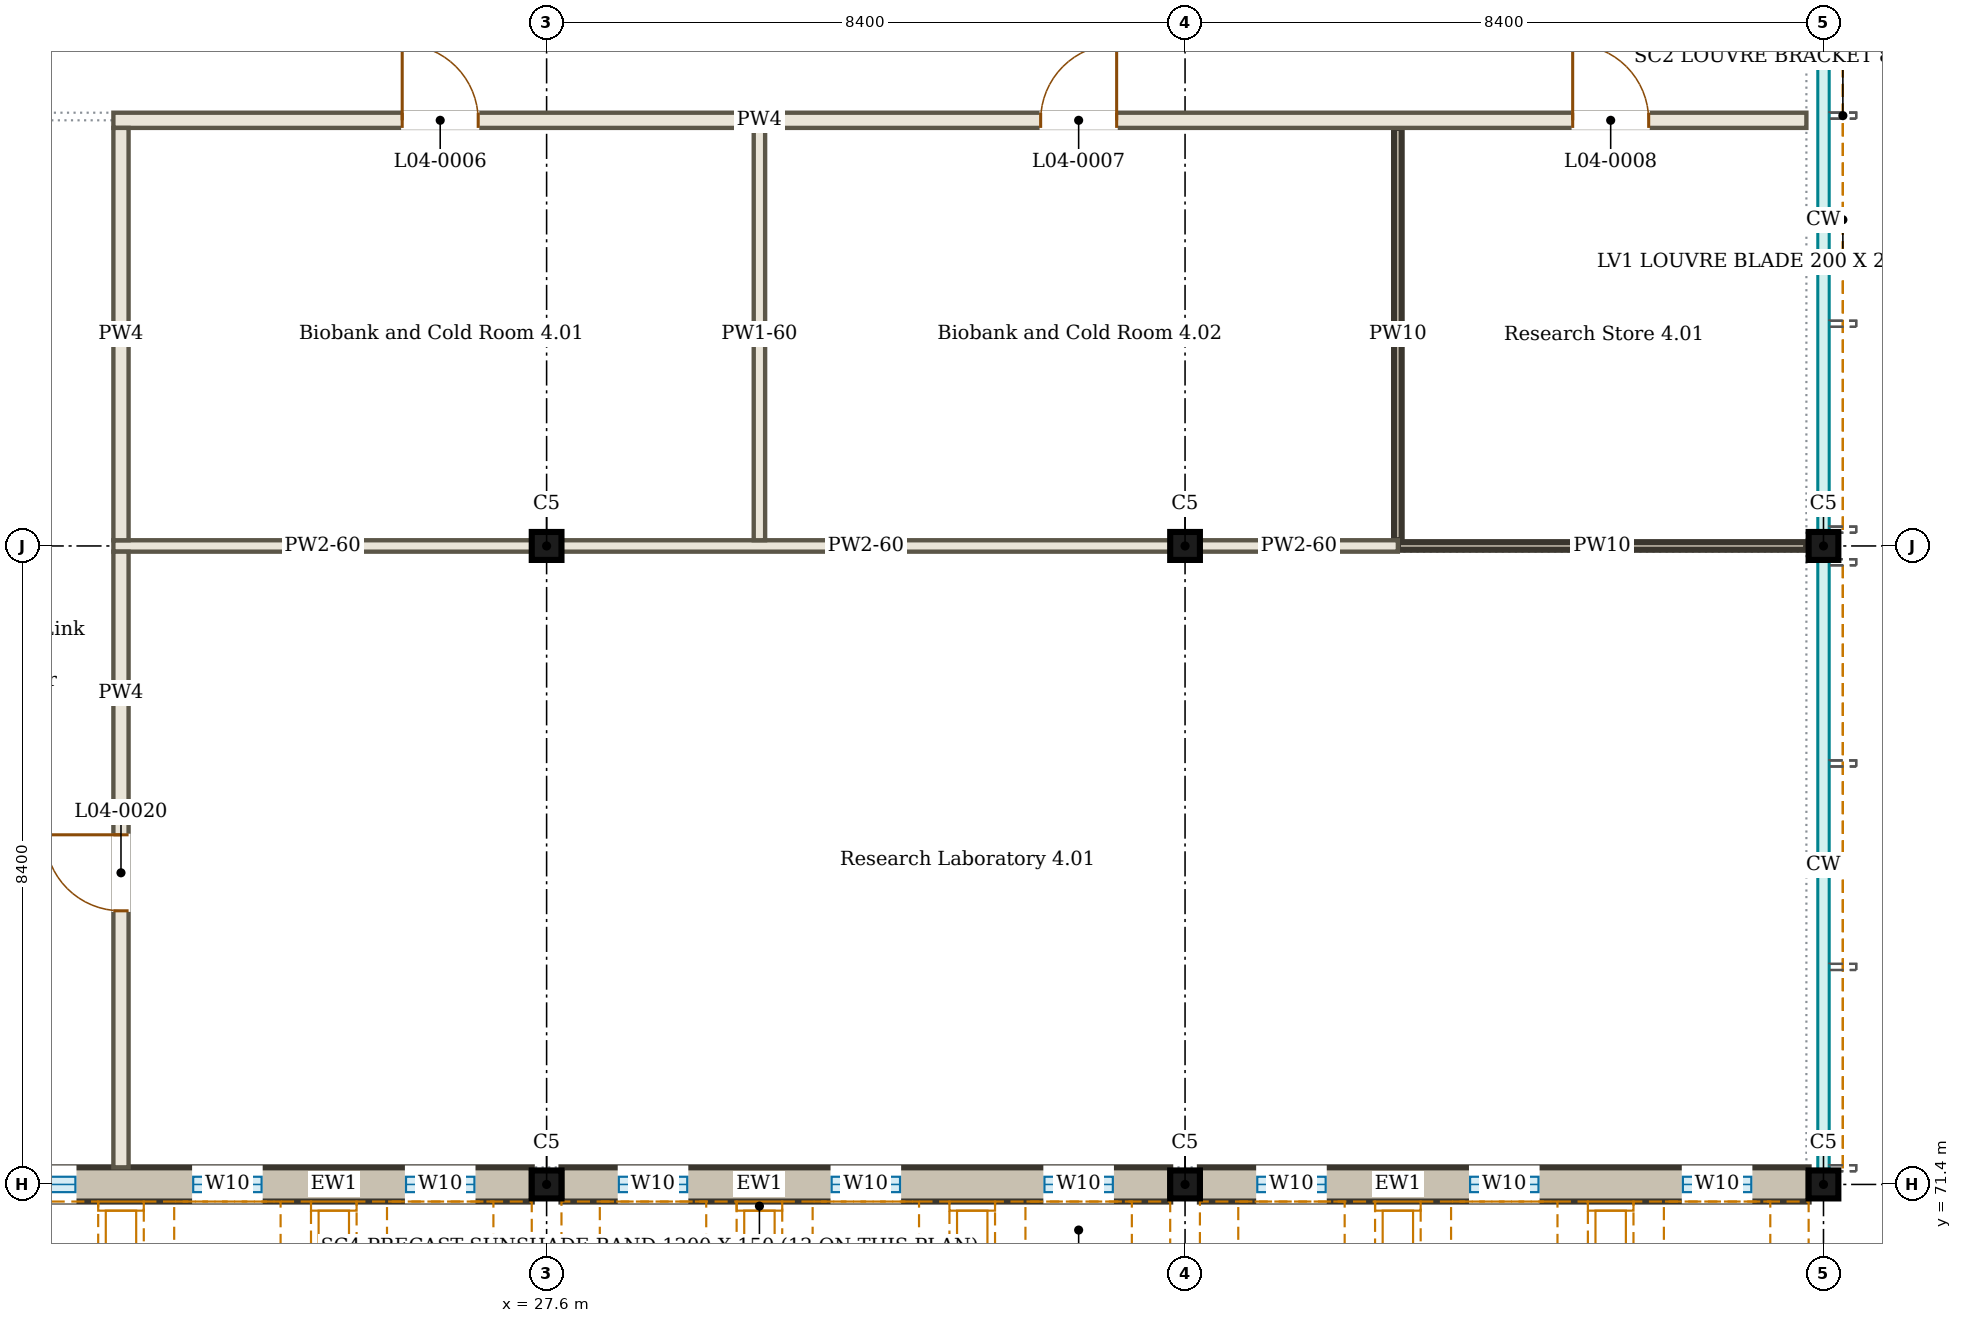
"""IFC4 building model, lengths in metres.
Left out: names, types, materials, properties, quantities, classifications, styles, units other than length and angle.
Written with IfcOpenShell. Run it as: python <this file> out.ifc"""

import sys

from ifc_helpers import new_model, si_unit, direction, frame, frame_2d, origin, origin_2d, place, context, subcontext, project, spatial, rectangle, i_section, extrude, element, fill, save


model = new_model("IFC4")
c1 = context("Model", 3, precision=1e-05, world=origin(), true_north=direction((0.0, 1.0)))
c2 = subcontext(c1, "Body", "Model", "MODEL_VIEW")
j1 = project(units=[si_unit("LENGTHUNIT", "METRE"), si_unit("PLANEANGLEUNIT", "RADIAN")], contexts=[c1])
p1 = place(None, origin())
s1 = spatial("IfcSite", under=j1, at=p1, CompositionType="ELEMENT")
p2 = place(p1, origin())
s2 = spatial("IfcBuilding", under=s1, at=p2, CompositionType="ELEMENT")
p3 = place(p2, frame((0.0, 0.0, 18.0)))
s3 = spatial("IfcBuildingStorey", under=s2, at=p3, CompositionType="ELEMENT", Elevation=18.0)
for number, where, z_axis, x_axis in (
    (1, (27.6, 71.4, 0.0), (0.0, 0.0, 1.0), (1.0, 0.0, 0.0)),
    (2, (36.0, 71.4, 0.0), (0.0, 0.0, 1.0), (1.0, 0.0, 0.0)),
    (3, (44.4, 71.4, 0.0), (0.0, 0.0, 1.0), (1.0, 0.0, 0.0)),
    (4, (27.6, 79.8, 0.0), (0.0, 0.0, 1.0), (1.0, 0.0, 0.0)),
    (5, (36.0, 79.8, 0.0), (0.0, 0.0, 1.0), (1.0, 0.0, 0.0)),
    (6, (44.4, 79.8, 0.0), (0.0, 0.0, 1.0), (1.0, 0.0, 0.0)),
):
    element("IfcColumn", number, at=place(p3, frame(where, z_axis=z_axis, x_axis=x_axis)), inside=s3, PredefinedType="COLUMN", context=c2, shape_type="SweptSolid", body=[
        extrude(i_section(OverallWidth=0.391, OverallDepth=0.368, WebThickness=0.015, FlangeThickness=0.024, FilletRadius=0.027, at=origin_2d()), origin(), (0.0, 0.0, 1.0), 4.5),
    ])
p4 = place(p3, frame((19.2, 71.4, 0.0), z_axis=(0.0, 0.0, 1.0), x_axis=(1.0, 0.0, 0.0)))
e7 = element("IfcWall", 7, at=p4, inside=s3, PredefinedType="SOLIDWALL", context=c2, shape_type="SweptSolid", body=[
    extrude(rectangle(XDim=8.205, YDim=0.45, at=frame_2d((4.102, 0.0))), origin(), (0.0, 0.0, 1.0), 3.886),
])
p5 = place(p4, frame((0.6, 0.0, 2.7)))
e8 = element("IfcOpeningElement", 8, at=p5, cuts=e7, PredefinedType="OPENING", context=c2, shape_type="SweptSolid", body=[
    extrude(rectangle(XDim=1.6, YDim=0.6, at=frame_2d((0.8, 0.3))), frame((0.0, 0.235, 0.0), z_axis=(0.0, -1.0, 0.0), x_axis=(1.0, 0.0, 0.0)), (0.0, 0.0, 1.0), 0.47),
])
p6 = place(p4, frame((3.75, 0.0, 1.0)))
e9 = element("IfcOpeningElement", 9, at=p6, cuts=e7, PredefinedType="OPENING", context=c2, shape_type="SweptSolid", body=[
    extrude(rectangle(XDim=0.9, YDim=1.2, at=frame_2d((0.45, 0.6))), frame((0.0, 0.235, 0.0), z_axis=(0.0, -1.0, 0.0), x_axis=(1.0, 0.0, 0.0)), (0.0, 0.0, 1.0), 0.47),
])
p7 = place(p4, frame((6.55, 0.0, 1.0)))
e10 = element("IfcOpeningElement", 10, at=p7, cuts=e7, PredefinedType="OPENING", context=c2, shape_type="SweptSolid", body=[
    extrude(rectangle(XDim=0.9, YDim=1.2, at=frame_2d((0.45, 0.6))), frame((0.0, 0.235, 0.0), z_axis=(0.0, -1.0, 0.0), x_axis=(1.0, 0.0, 0.0)), (0.0, 0.0, 1.0), 0.47),
])
p8 = place(p3, frame((27.795, 71.4, 0.0), z_axis=(0.0, 0.0, 1.0), x_axis=(1.0, 0.0, 0.0)))
e11 = element("IfcWall", 11, at=p8, inside=s3, PredefinedType="SOLIDWALL", context=c2, shape_type="SweptSolid", body=[
    extrude(rectangle(XDim=8.009, YDim=0.45, at=frame_2d((4.004, 0.0))), origin(), (0.0, 0.0, 1.0), 3.886),
])
p9 = place(p8, frame((0.754, 0.0, 1.0)))
e12 = element("IfcOpeningElement", 12, at=p9, cuts=e11, PredefinedType="OPENING", context=c2, shape_type="SweptSolid", body=[
    extrude(rectangle(XDim=0.9, YDim=1.2, at=frame_2d((0.45, 0.6))), frame((0.0, 0.235, 0.0), z_axis=(0.0, -1.0, 0.0), x_axis=(1.0, 0.0, 0.0)), (0.0, 0.0, 1.0), 0.47),
])
p10 = place(p8, frame((3.554, 0.0, 1.0)))
e13 = element("IfcOpeningElement", 13, at=p10, cuts=e11, PredefinedType="OPENING", context=c2, shape_type="SweptSolid", body=[
    extrude(rectangle(XDim=0.9, YDim=1.2, at=frame_2d((0.45, 0.6))), frame((0.0, 0.235, 0.0), z_axis=(0.0, -1.0, 0.0), x_axis=(1.0, 0.0, 0.0)), (0.0, 0.0, 1.0), 0.47),
])
p11 = place(p8, frame((6.354, 0.0, 1.0)))
e14 = element("IfcOpeningElement", 14, at=p11, cuts=e11, PredefinedType="OPENING", context=c2, shape_type="SweptSolid", body=[
    extrude(rectangle(XDim=0.9, YDim=1.2, at=frame_2d((0.45, 0.6))), frame((0.0, 0.235, 0.0), z_axis=(0.0, -1.0, 0.0), x_axis=(1.0, 0.0, 0.0)), (0.0, 0.0, 1.0), 0.47),
])
p12 = place(p3, frame((36.196, 71.4, 0.0), z_axis=(0.0, 0.0, 1.0), x_axis=(1.0, 0.0, 0.0)))
e15 = element("IfcWall", 15, at=p12, inside=s3, PredefinedType="SOLIDWALL", context=c2, shape_type="SweptSolid", body=[
    extrude(rectangle(XDim=8.009, YDim=0.45, at=frame_2d((4.004, 0.0))), origin(), (0.0, 0.0, 1.0), 3.886),
])
p13 = place(p12, frame((0.754, 0.0, 1.0)))
e16 = element("IfcOpeningElement", 16, at=p13, cuts=e15, PredefinedType="OPENING", context=c2, shape_type="SweptSolid", body=[
    extrude(rectangle(XDim=0.9, YDim=1.2, at=frame_2d((0.45, 0.6))), frame((0.0, 0.235, 0.0), z_axis=(0.0, -1.0, 0.0), x_axis=(1.0, 0.0, 0.0)), (0.0, 0.0, 1.0), 0.47),
])
p14 = place(p12, frame((3.554, 0.0, 1.0)))
e17 = element("IfcOpeningElement", 17, at=p14, cuts=e15, PredefinedType="OPENING", context=c2, shape_type="SweptSolid", body=[
    extrude(rectangle(XDim=0.9, YDim=1.2, at=frame_2d((0.45, 0.6))), frame((0.0, 0.235, 0.0), z_axis=(0.0, -1.0, 0.0), x_axis=(1.0, 0.0, 0.0)), (0.0, 0.0, 1.0), 0.47),
])
p15 = place(p12, frame((6.354, 0.0, 1.0)))
e18 = element("IfcOpeningElement", 18, at=p15, cuts=e15, PredefinedType="OPENING", context=c2, shape_type="SweptSolid", body=[
    extrude(rectangle(XDim=0.9, YDim=1.2, at=frame_2d((0.45, 0.6))), frame((0.0, 0.235, 0.0), z_axis=(0.0, -1.0, 0.0), x_axis=(1.0, 0.0, 0.0)), (0.0, 0.0, 1.0), 0.47),
])
p16 = place(p3, frame((21.9, 79.8, 0.0), z_axis=(0.0, 0.0, 1.0), x_axis=(1.0, 0.0, 0.0)))
e19 = element("IfcWall", 19, at=p16, inside=s3, PredefinedType="PARTITIONING", context=c2, shape_type="SweptSolid", body=[
    extrude(rectangle(XDim=5.505, YDim=0.15, at=frame_2d((2.752, 0.0))), origin(), (0.0, 0.0, 1.0), 3.9),
])
p17 = place(p3, frame((27.795, 79.8, 0.0), z_axis=(0.0, 0.0, 1.0), x_axis=(1.0, 0.0, 0.0)))
e20 = element("IfcWall", 20, at=p17, inside=s3, PredefinedType="PARTITIONING", context=c2, shape_type="SweptSolid", body=[
    extrude(rectangle(XDim=8.009, YDim=0.15, at=frame_2d((4.004, 0.0))), origin(), (0.0, 0.0, 1.0), 3.9),
])
p18 = place(p3, frame((36.196, 79.8, 0.0), z_axis=(0.0, 0.0, 1.0), x_axis=(1.0, 0.0, 0.0)))
e21 = element("IfcWall", 21, at=p18, inside=s3, PredefinedType="PARTITIONING", context=c2, shape_type="SweptSolid", body=[
    extrude(rectangle(XDim=2.604, YDim=0.15, at=frame_2d((1.302, 0.0))), origin(), (0.0, 0.0, 1.0), 3.9),
])
p19 = place(p3, frame((38.8, 79.8, 0.0), z_axis=(0.0, 0.0, 1.0), x_axis=(1.0, 0.0, 0.0)))
e22 = element("IfcWall", 22, at=p19, inside=s3, PredefinedType="SOLIDWALL", context=c2, shape_type="SweptSolid", body=[
    extrude(rectangle(XDim=5.375, YDim=0.1, at=frame_2d((2.688, 0.0))), origin(), (0.0, 0.0, 1.0), 3.9),
])
p20 = place(p3, frame((21.9, 85.4, 0.0), z_axis=(0.0, 0.0, 1.0), x_axis=(1.0, 0.0, 0.0)))
e23 = element("IfcWall", 23, at=p20, inside=s3, PredefinedType="PARTITIONING", context=c2, shape_type="SweptSolid", body=[
    extrude(rectangle(XDim=22.275, YDim=0.2, at=frame_2d((11.138, 0.0))), origin(), (0.0, 0.0, 1.0), 3.9),
])
p21 = place(p20, frame((3.8, 0.0, 0.0)))
e24 = element("IfcOpeningElement", 24, at=p21, cuts=e23, PredefinedType="OPENING", context=c2, shape_type="SweptSolid", body=[
    extrude(rectangle(XDim=1.0, YDim=2.1, at=frame_2d((0.5, 1.05))), frame((0.0, 0.11, 0.0), z_axis=(0.0, -1.0, 0.0), x_axis=(1.0, 0.0, 0.0)), (0.0, 0.0, 1.0), 0.22),
])
p22 = place(p20, frame((12.2, 0.0, 0.0)))
e25 = element("IfcOpeningElement", 25, at=p22, cuts=e23, PredefinedType="OPENING", context=c2, shape_type="SweptSolid", body=[
    extrude(rectangle(XDim=1.0, YDim=2.1, at=frame_2d((0.5, 1.05))), frame((0.0, 0.11, 0.0), z_axis=(0.0, -1.0, 0.0), x_axis=(1.0, 0.0, 0.0)), (0.0, 0.0, 1.0), 0.22),
])
p23 = place(p20, frame((19.2, 0.0, 0.0)))
e26 = element("IfcOpeningElement", 26, at=p23, cuts=e23, PredefinedType="OPENING", context=c2, shape_type="SweptSolid", body=[
    extrude(rectangle(XDim=1.0, YDim=2.1, at=frame_2d((0.5, 1.05))), frame((0.0, 0.11, 0.0), z_axis=(0.0, -1.0, 0.0), x_axis=(1.0, 0.0, 0.0)), (0.0, 0.0, 1.0), 0.22),
])
p24 = place(p3, frame((22.0, 71.625, 0.0), z_axis=(0.0, 0.0, 1.0), x_axis=(0.0, 1.0, 0.0)))
e27 = element("IfcWall", 27, at=p24, inside=s3, PredefinedType="PARTITIONING", context=c2, shape_type="SweptSolid", body=[
    extrude(rectangle(XDim=8.1, YDim=0.2, at=frame_2d((4.05, 0.0))), origin(), (0.0, 0.0, 1.0), 3.9),
])
p25 = place(p24, frame((3.375, 0.0, 0.0)))
e28 = element("IfcOpeningElement", 28, at=p25, cuts=e27, PredefinedType="OPENING", context=c2, shape_type="SweptSolid", body=[
    extrude(rectangle(XDim=1.0, YDim=2.1, at=frame_2d((0.5, 1.05))), frame((0.0, 0.11, 0.0), z_axis=(0.0, -1.0, 0.0), x_axis=(1.0, 0.0, 0.0)), (0.0, 0.0, 1.0), 0.22),
])
p26 = place(p3, frame((22.0, 79.875, 0.0), z_axis=(0.0, 0.0, 1.0), x_axis=(0.0, 1.0, 0.0)))
e29 = element("IfcWall", 29, at=p26, inside=s3, PredefinedType="PARTITIONING", context=c2, shape_type="SweptSolid", body=[
    extrude(rectangle(XDim=5.425, YDim=0.2, at=frame_2d((2.712, 0.0))), origin(), (0.0, 0.0, 1.0), 3.9),
])
p27 = place(p3, frame((30.4, 79.875, 0.0), z_axis=(0.0, 0.0, 1.0), x_axis=(0.0, 1.0, 0.0)))
e30 = element("IfcWall", 30, at=p27, inside=s3, PredefinedType="PARTITIONING", context=c2, shape_type="SweptSolid", body=[
    extrude(rectangle(XDim=5.425, YDim=0.15, at=frame_2d((2.712, 0.0))), origin(), (0.0, 0.0, 1.0), 3.9),
])
p28 = place(p3, frame((38.8, 79.875, 0.0), z_axis=(0.0, 0.0, 1.0), x_axis=(0.0, 1.0, 0.0)))
e31 = element("IfcWall", 31, at=p28, inside=s3, PredefinedType="SOLIDWALL", context=c2, shape_type="SweptSolid", body=[
    extrude(rectangle(XDim=5.425, YDim=0.1, at=frame_2d((2.712, 0.0))), origin(), (0.0, 0.0, 1.0), 3.9),
])
p29 = place(p5, origin())
e32 = element("IfcWindow", 32, at=p29, inside=s3, PartitioningType="SINGLE_PANEL", PredefinedType="WINDOW", context=c2, shape_type="SweptSolid", body=[
    extrude(rectangle(XDim=1.6, YDim=0.6, at=frame_2d((0.8, 0.3))), frame((0.0, 0.03, 0.0), z_axis=(0.0, -1.0, 0.0), x_axis=(1.0, 0.0, 0.0)), (0.0, 0.0, 1.0), 0.06),
])
fill(e8, e32)
p30 = place(p6, origin())
e33 = element("IfcWindow", 33, at=p30, inside=s3, PartitioningType="SINGLE_PANEL", PredefinedType="WINDOW", context=c2, shape_type="SweptSolid", body=[
    extrude(rectangle(XDim=0.9, YDim=1.2, at=frame_2d((0.45, 0.6))), frame((0.0, 0.135, 0.0), z_axis=(0.0, -1.0, 0.0), x_axis=(1.0, 0.0, 0.0)), (0.0, 0.0, 1.0), 0.06),
])
fill(e9, e33)
p31 = place(p7, origin())
e34 = element("IfcWindow", 34, at=p31, inside=s3, PartitioningType="SINGLE_PANEL", PredefinedType="WINDOW", context=c2, shape_type="SweptSolid", body=[
    extrude(rectangle(XDim=0.9, YDim=1.2, at=frame_2d((0.45, 0.6))), frame((0.0, 0.135, 0.0), z_axis=(0.0, -1.0, 0.0), x_axis=(1.0, 0.0, 0.0)), (0.0, 0.0, 1.0), 0.06),
])
fill(e10, e34)
p32 = place(p9, origin())
e35 = element("IfcWindow", 35, at=p32, inside=s3, PartitioningType="SINGLE_PANEL", PredefinedType="WINDOW", context=c2, shape_type="SweptSolid", body=[
    extrude(rectangle(XDim=0.9, YDim=1.2, at=frame_2d((0.45, 0.6))), frame((0.0, 0.135, 0.0), z_axis=(0.0, -1.0, 0.0), x_axis=(1.0, 0.0, 0.0)), (0.0, 0.0, 1.0), 0.06),
])
fill(e12, e35)
p33 = place(p10, origin())
e36 = element("IfcWindow", 36, at=p33, inside=s3, PartitioningType="SINGLE_PANEL", PredefinedType="WINDOW", context=c2, shape_type="SweptSolid", body=[
    extrude(rectangle(XDim=0.9, YDim=1.2, at=frame_2d((0.45, 0.6))), frame((0.0, 0.135, 0.0), z_axis=(0.0, -1.0, 0.0), x_axis=(1.0, 0.0, 0.0)), (0.0, 0.0, 1.0), 0.06),
])
fill(e13, e36)
p34 = place(p11, origin())
e37 = element("IfcWindow", 37, at=p34, inside=s3, PartitioningType="SINGLE_PANEL", PredefinedType="WINDOW", context=c2, shape_type="SweptSolid", body=[
    extrude(rectangle(XDim=0.9, YDim=1.2, at=frame_2d((0.45, 0.6))), frame((0.0, 0.135, 0.0), z_axis=(0.0, -1.0, 0.0), x_axis=(1.0, 0.0, 0.0)), (0.0, 0.0, 1.0), 0.06),
])
fill(e14, e37)
p35 = place(p13, origin())
e38 = element("IfcWindow", 38, at=p35, inside=s3, PartitioningType="SINGLE_PANEL", PredefinedType="WINDOW", context=c2, shape_type="SweptSolid", body=[
    extrude(rectangle(XDim=0.9, YDim=1.2, at=frame_2d((0.45, 0.6))), frame((0.0, 0.135, 0.0), z_axis=(0.0, -1.0, 0.0), x_axis=(1.0, 0.0, 0.0)), (0.0, 0.0, 1.0), 0.06),
])
fill(e16, e38)
p36 = place(p14, origin())
e39 = element("IfcWindow", 39, at=p36, inside=s3, PartitioningType="SINGLE_PANEL", PredefinedType="WINDOW", context=c2, shape_type="SweptSolid", body=[
    extrude(rectangle(XDim=0.9, YDim=1.2, at=frame_2d((0.45, 0.6))), frame((0.0, 0.135, 0.0), z_axis=(0.0, -1.0, 0.0), x_axis=(1.0, 0.0, 0.0)), (0.0, 0.0, 1.0), 0.06),
])
fill(e17, e39)
p37 = place(p15, origin())
e40 = element("IfcWindow", 40, at=p37, inside=s3, PartitioningType="SINGLE_PANEL", PredefinedType="WINDOW", context=c2, shape_type="SweptSolid", body=[
    extrude(rectangle(XDim=0.9, YDim=1.2, at=frame_2d((0.45, 0.6))), frame((0.0, 0.135, 0.0), z_axis=(0.0, -1.0, 0.0), x_axis=(1.0, 0.0, 0.0)), (0.0, 0.0, 1.0), 0.06),
])
fill(e18, e40)
p38 = place(p21, origin())
e41 = element("IfcDoor", 41, at=p38, inside=s3, OperationType="SINGLE_SWING_LEFT", PredefinedType="DOOR", context=c2, shape_type="SweptSolid", body=[
    extrude(rectangle(XDim=1.0, YDim=2.1, at=frame_2d((0.5, 1.05))), frame((0.0, 0.025, 0.0), z_axis=(0.0, -1.0, 0.0), x_axis=(1.0, 0.0, 0.0)), (0.0, 0.0, 1.0), 0.05),
])
fill(e24, e41)
p39 = place(p22, origin())
e42 = element("IfcDoor", 42, at=p39, inside=s3, OperationType="SINGLE_SWING_RIGHT", PredefinedType="DOOR", context=c2, shape_type="SweptSolid", body=[
    extrude(rectangle(XDim=1.0, YDim=2.1, at=frame_2d((0.5, 1.05))), frame((0.0, 0.025, 0.0), z_axis=(0.0, -1.0, 0.0), x_axis=(1.0, 0.0, 0.0)), (0.0, 0.0, 1.0), 0.05),
])
fill(e25, e42)
p40 = place(p23, origin())
e43 = element("IfcDoor", 43, at=p40, inside=s3, OperationType="SINGLE_SWING_LEFT", PredefinedType="DOOR", context=c2, shape_type="SweptSolid", body=[
    extrude(rectangle(XDim=1.0, YDim=2.1, at=frame_2d((0.5, 1.05))), frame((0.0, 0.025, 0.0), z_axis=(0.0, -1.0, 0.0), x_axis=(1.0, 0.0, 0.0)), (0.0, 0.0, 1.0), 0.05),
])
fill(e26, e43)
p41 = place(p25, origin())
e44 = element("IfcDoor", 44, at=p41, inside=s3, OperationType="SINGLE_SWING_RIGHT", PredefinedType="DOOR", context=c2, shape_type="SweptSolid", body=[
    extrude(rectangle(XDim=1.0, YDim=2.1, at=frame_2d((0.5, 1.05))), frame((0.0, 0.025, 0.0), z_axis=(0.0, -1.0, 0.0), x_axis=(1.0, 0.0, 0.0)), (0.0, 0.0, 1.0), 0.05),
])
fill(e28, e44)
save(model, sys.argv[1])
